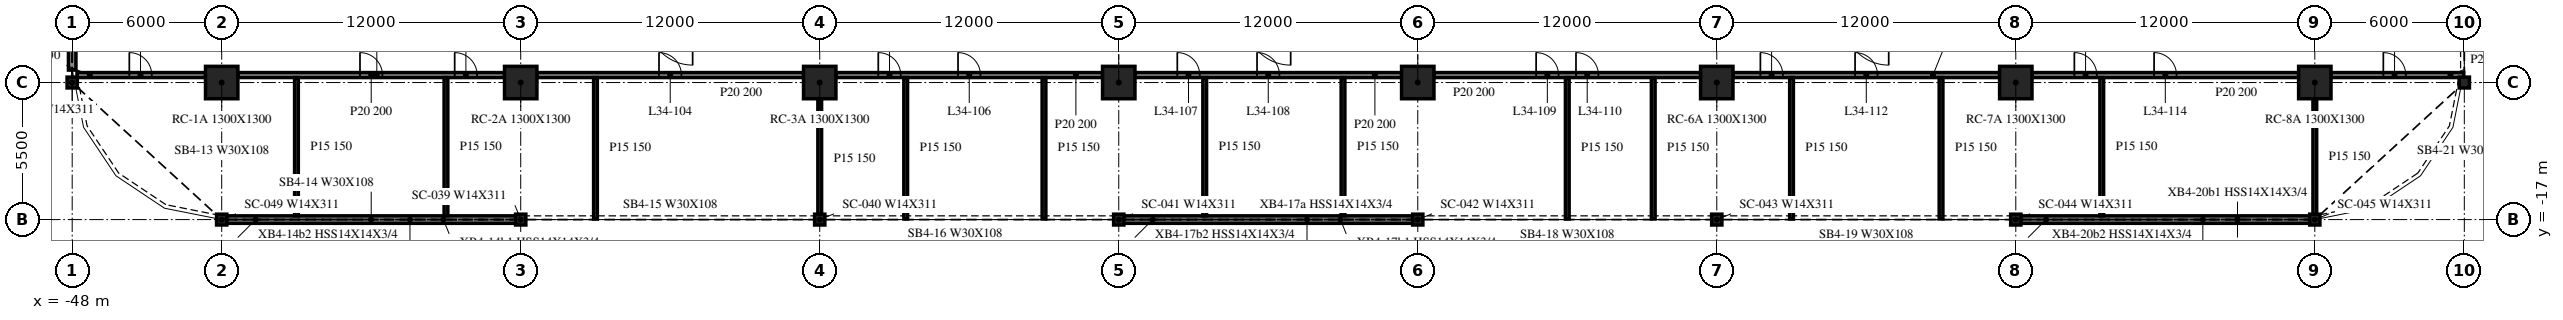
"""IFC4 building model, lengths in metres.
Left out: names, types, materials, properties, quantities, classifications, styles, units other than length and angle.
Written with IfcOpenShell. Run it as: python <this file> out.ifc"""

import sys

from ifc_helpers import new_model, si_unit, direction, frame, frame_2d, origin, origin_2d, place, context, subcontext, project, spatial, rectangle, i_section, extrude, element, fill, save


model = new_model("IFC4")
c1 = context("Model", 3, precision=1e-05, world=origin(), true_north=direction((0.0, 1.0)))
c2 = subcontext(c1, "Body", "Model", "MODEL_VIEW")
j1 = project(units=[si_unit("LENGTHUNIT", "METRE"), si_unit("PLANEANGLEUNIT", "RADIAN")], contexts=[c1])
p1 = place(None, origin())
s1 = spatial("IfcSite", under=j1, at=p1, CompositionType="ELEMENT")
p2 = place(p1, origin())
s2 = spatial("IfcBuilding", under=s1, at=p2, CompositionType="ELEMENT")
p3 = place(p2, frame((0.0, 0.0, 146.6)))
s3 = spatial("IfcBuildingStorey", under=s2, at=p3, CompositionType="ELEMENT", Elevation=146.6)
for number, where, z_axis, x_axis in (
    (1, (-42.0, -11.5, -0.34), (0.0, 0.0, 1.0), (1.0, 0.0, 0.0)),
    (2, (-30.0, -11.5, -0.34), (0.0, 0.0, 1.0), (1.0, 0.0, 0.0)),
    (3, (-18.0, -11.5, -0.34), (0.0, 0.0, 1.0), (1.0, 0.0, 0.0)),
    (4, (-6.0, -11.5, -0.34), (0.0, 0.0, 1.0), (1.0, 0.0, 0.0)),
    (5, (6.0, -11.5, -0.34), (0.0, 0.0, 1.0), (1.0, 0.0, 0.0)),
    (6, (18.0, -11.5, -0.34), (0.0, 0.0, 1.0), (1.0, 0.0, 0.0)),
    (7, (30.0, -11.5, -0.34), (0.0, 0.0, 1.0), (1.0, 0.0, 0.0)),
    (8, (42.0, -11.5, -0.34), (0.0, 0.0, 1.0), (1.0, 0.0, 0.0)),
):
    element("IfcColumn", number, at=place(p3, frame(where, z_axis=z_axis, x_axis=x_axis)), inside=s3, PredefinedType="COLUMN", context=c2, shape_type="SweptSolid", body=[
        extrude(rectangle(XDim=1.3, YDim=1.3, at=origin_2d()), origin(), (0.0, 0.0, 1.0), 4.1),
    ])
for number, where, z_axis, x_axis in (
    (9, (-48.0, -11.5, -0.34), (0.0, 0.0, 1.0), (1.0, 0.0, 0.0)),
    (10, (-42.0, -17.0, -0.34), (0.0, 0.0, 1.0), (1.0, 0.0, 0.0)),
    (11, (-30.0, -17.0, -0.34), (0.0, 0.0, 1.0), (1.0, 0.0, 0.0)),
    (12, (-18.0, -17.0, -0.34), (0.0, 0.0, 1.0), (1.0, 0.0, 0.0)),
    (13, (-6.0, -17.0, -0.34), (0.0, 0.0, 1.0), (1.0, 0.0, 0.0)),
    (14, (6.0, -17.0, -0.34), (0.0, 0.0, 1.0), (1.0, 0.0, 0.0)),
    (15, (18.0, -17.0, -0.34), (0.0, 0.0, 1.0), (1.0, 0.0, 0.0)),
    (16, (30.0, -17.0, -0.34), (0.0, 0.0, 1.0), (1.0, 0.0, 0.0)),
    (17, (42.0, -17.0, -0.34), (0.0, 0.0, 1.0), (1.0, 0.0, 0.0)),
    (18, (48.0, -11.5, -0.34), (0.0, 0.0, 1.0), (1.0, 0.0, 0.0)),
):
    element("IfcColumn", number, at=place(p3, frame(where, z_axis=z_axis, x_axis=x_axis)), inside=s3, PredefinedType="COLUMN", context=c2, shape_type="SweptSolid", body=[
        extrude(i_section(OverallWidth=0.412, OverallDepth=0.434, WebThickness=0.036, FlangeThickness=0.057, at=origin_2d()), origin(), (0.0, 0.0, 1.0), 4.1),
    ])
p4 = place(p3, frame((-48.0, -0.218, 0.0), z_axis=(0.0, 0.0, 1.0), x_axis=(0.0, -1.0, 0.0)))
e19 = element("IfcWall", 19, at=p4, inside=s3, PredefinedType="NOTDEFINED", context=c2, shape_type="SweptSolid", body=[
    extrude(rectangle(XDim=10.782, YDim=0.3, at=frame_2d((5.391, 0.0))), origin(), (0.0, 0.0, 1.0), 3.003),
])
for number, where, z_axis, x_axis in (
    (20, (-41.982, -17.0, 0.0), (0.0, 0.0, 1.0), (1.0, 0.0, 0.0)),
    (21, (-5.982, -17.0, 0.0), (0.0, 0.0, 1.0), (1.0, 0.0, 0.0)),
    (22, (30.018, -17.0, 0.0), (0.0, 0.0, 1.0), (1.0, 0.0, 0.0)),
):
    element("IfcWall", number, at=place(p3, frame(where, z_axis=z_axis, x_axis=x_axis)), inside=s3, PredefinedType="NOTDEFINED", context=c2, shape_type="SweptSolid", body=[
        extrude(rectangle(XDim=11.964, YDim=0.3, at=frame_2d((5.982, 0.0))), origin(), (0.0, 0.0, 1.0), 3.003),
    ])
p5 = place(p3, frame((-47.807, -11.2, 0.0), z_axis=(0.0, 0.0, 1.0), x_axis=(1.0, 0.0, 0.0)))
e23 = element("IfcWall", 23, at=p5, inside=s3, PredefinedType="PARTITIONING", context=c2, shape_type="SweptSolid", body=[
    extrude(rectangle(XDim=5.157, YDim=0.2, at=frame_2d((2.579, 0.0))), origin(), (0.0, 0.0, 1.0), 3.76),
])
p6 = place(p5, frame((2.1, 0.0, 0.0)))
e24 = element("IfcOpeningElement", 24, at=p6, cuts=e23, PredefinedType="OPENING", context=c2, shape_type="SweptSolid", body=[
    extrude(rectangle(XDim=0.9, YDim=2.1, at=frame_2d((0.45, 1.05))), frame((0.0, 0.11, 0.0), z_axis=(0.0, -1.0, 0.0), x_axis=(1.0, 0.0, 0.0)), (0.0, 0.0, 1.0), 0.22),
])
p7 = place(p3, frame((-41.35, -11.2, 0.0), z_axis=(0.0, 0.0, 1.0), x_axis=(1.0, 0.0, 0.0)))
e25 = element("IfcWall", 25, at=p7, inside=s3, PredefinedType="PARTITIONING", context=c2, shape_type="SweptSolid", body=[
    extrude(rectangle(XDim=10.7, YDim=0.2, at=frame_2d((5.35, 0.0))), origin(), (0.0, 0.0, 1.0), 3.76),
])
p8 = place(p7, frame((4.9, 0.0, 0.0)))
e26 = element("IfcOpeningElement", 26, at=p8, cuts=e25, PredefinedType="OPENING", context=c2, shape_type="SweptSolid", body=[
    extrude(rectangle(XDim=0.9, YDim=2.1, at=frame_2d((0.45, 1.05))), frame((0.0, 0.11, 0.0), z_axis=(0.0, -1.0, 0.0), x_axis=(1.0, 0.0, 0.0)), (0.0, 0.0, 1.0), 0.22),
])
p9 = place(p7, frame((8.7, 0.0, 0.0)))
e27 = element("IfcOpeningElement", 27, at=p9, cuts=e25, PredefinedType="OPENING", context=c2, shape_type="SweptSolid", body=[
    extrude(rectangle(XDim=0.9, YDim=2.1, at=frame_2d((0.45, 1.05))), frame((0.0, 0.11, 0.0), z_axis=(0.0, -1.0, 0.0), x_axis=(1.0, 0.0, 0.0)), (0.0, 0.0, 1.0), 0.22),
])
p10 = place(p3, frame((-29.35, -11.2, 0.0), z_axis=(0.0, 0.0, 1.0), x_axis=(1.0, 0.0, 0.0)))
e28 = element("IfcWall", 28, at=p10, inside=s3, PredefinedType="PARTITIONING", context=c2, shape_type="SweptSolid", body=[
    extrude(rectangle(XDim=10.7, YDim=0.2, at=frame_2d((5.35, 0.0))), origin(), (0.0, 0.0, 1.0), 3.76),
])
p11 = place(p10, frame((4.9, 0.0, 0.0)))
e29 = element("IfcOpeningElement", 29, at=p11, cuts=e28, PredefinedType="OPENING", context=c2, shape_type="SweptSolid", body=[
    extrude(rectangle(XDim=0.9, YDim=2.1, at=frame_2d((0.45, 1.05))), frame((0.0, 0.11, 0.0), z_axis=(0.0, -1.0, 0.0), x_axis=(1.0, 0.0, 0.0)), (0.0, 0.0, 1.0), 0.22),
])
p12 = place(p3, frame((-17.35, -11.2, 0.0), z_axis=(0.0, 0.0, 1.0), x_axis=(1.0, 0.0, 0.0)))
e30 = element("IfcWall", 30, at=p12, inside=s3, PredefinedType="PARTITIONING", context=c2, shape_type="SweptSolid", body=[
    extrude(rectangle(XDim=10.7, YDim=0.2, at=frame_2d((5.35, 0.0))), origin(), (0.0, 0.0, 1.0), 3.76),
])
p13 = place(p12, frame((1.7, 0.0, 0.0)))
e31 = element("IfcOpeningElement", 31, at=p13, cuts=e30, PredefinedType="OPENING", context=c2, shape_type="SweptSolid", body=[
    extrude(rectangle(XDim=0.9, YDim=2.1, at=frame_2d((0.45, 1.05))), frame((0.0, 0.11, 0.0), z_axis=(0.0, -1.0, 0.0), x_axis=(1.0, 0.0, 0.0)), (0.0, 0.0, 1.0), 0.22),
])
p14 = place(p12, frame((4.9, 0.0, 0.0)))
e32 = element("IfcOpeningElement", 32, at=p14, cuts=e30, PredefinedType="OPENING", context=c2, shape_type="SweptSolid", body=[
    extrude(rectangle(XDim=0.9, YDim=2.1, at=frame_2d((0.45, 1.05))), frame((0.0, 0.11, 0.0), z_axis=(0.0, -1.0, 0.0), x_axis=(1.0, 0.0, 0.0)), (0.0, 0.0, 1.0), 0.22),
])
p15 = place(p3, frame((-5.35, -11.2, 0.0), z_axis=(0.0, 0.0, 1.0), x_axis=(1.0, 0.0, 0.0)))
e33 = element("IfcWall", 33, at=p15, inside=s3, PredefinedType="PARTITIONING", context=c2, shape_type="SweptSolid", body=[
    extrude(rectangle(XDim=10.7, YDim=0.2, at=frame_2d((5.35, 0.0))), origin(), (0.0, 0.0, 1.0), 3.76),
])
p16 = place(p15, frame((1.7, 0.0, 0.0)))
e34 = element("IfcOpeningElement", 34, at=p16, cuts=e33, PredefinedType="OPENING", context=c2, shape_type="SweptSolid", body=[
    extrude(rectangle(XDim=0.9, YDim=2.1, at=frame_2d((0.45, 1.05))), frame((0.0, 0.11, 0.0), z_axis=(0.0, -1.0, 0.0), x_axis=(1.0, 0.0, 0.0)), (0.0, 0.0, 1.0), 0.22),
])
p17 = place(p15, frame((4.9, 0.0, 0.0)))
e35 = element("IfcOpeningElement", 35, at=p17, cuts=e33, PredefinedType="OPENING", context=c2, shape_type="SweptSolid", body=[
    extrude(rectangle(XDim=0.9, YDim=2.1, at=frame_2d((0.45, 1.05))), frame((0.0, 0.11, 0.0), z_axis=(0.0, -1.0, 0.0), x_axis=(1.0, 0.0, 0.0)), (0.0, 0.0, 1.0), 0.22),
])
p18 = place(p3, frame((6.65, -11.2, 0.0), z_axis=(0.0, 0.0, 1.0), x_axis=(1.0, 0.0, 0.0)))
e36 = element("IfcWall", 36, at=p18, inside=s3, PredefinedType="PARTITIONING", context=c2, shape_type="SweptSolid", body=[
    extrude(rectangle(XDim=10.7, YDim=0.2, at=frame_2d((5.35, 0.0))), origin(), (0.0, 0.0, 1.0), 3.76),
])
p19 = place(p18, frame((4.1, 0.0, 0.0)))
e37 = element("IfcOpeningElement", 37, at=p19, cuts=e36, PredefinedType="OPENING", context=c2, shape_type="SweptSolid", body=[
    extrude(rectangle(XDim=0.9, YDim=2.1, at=frame_2d((0.45, 1.05))), frame((0.0, 0.11, 0.0), z_axis=(0.0, -1.0, 0.0), x_axis=(1.0, 0.0, 0.0)), (0.0, 0.0, 1.0), 0.22),
])
p20 = place(p18, frame((5.7, 0.0, 0.0)))
e38 = element("IfcOpeningElement", 38, at=p20, cuts=e36, PredefinedType="OPENING", context=c2, shape_type="SweptSolid", body=[
    extrude(rectangle(XDim=0.9, YDim=2.1, at=frame_2d((0.45, 1.05))), frame((0.0, 0.11, 0.0), z_axis=(0.0, -1.0, 0.0), x_axis=(1.0, 0.0, 0.0)), (0.0, 0.0, 1.0), 0.22),
])
p21 = place(p3, frame((18.65, -11.2, 0.0), z_axis=(0.0, 0.0, 1.0), x_axis=(1.0, 0.0, 0.0)))
e39 = element("IfcWall", 39, at=p21, inside=s3, PredefinedType="PARTITIONING", context=c2, shape_type="SweptSolid", body=[
    extrude(rectangle(XDim=10.7, YDim=0.2, at=frame_2d((5.35, 0.0))), origin(), (0.0, 0.0, 1.0), 3.76),
])
p22 = place(p21, frame((1.1, 0.0, 0.0)))
e40 = element("IfcOpeningElement", 40, at=p22, cuts=e39, PredefinedType="OPENING", context=c2, shape_type="SweptSolid", body=[
    extrude(rectangle(XDim=0.9, YDim=2.1, at=frame_2d((0.45, 1.05))), frame((0.0, 0.11, 0.0), z_axis=(0.0, -1.0, 0.0), x_axis=(1.0, 0.0, 0.0)), (0.0, 0.0, 1.0), 0.22),
])
p23 = place(p21, frame((4.9, 0.0, 0.0)))
e41 = element("IfcOpeningElement", 41, at=p23, cuts=e39, PredefinedType="OPENING", context=c2, shape_type="SweptSolid", body=[
    extrude(rectangle(XDim=0.9, YDim=2.1, at=frame_2d((0.45, 1.05))), frame((0.0, 0.11, 0.0), z_axis=(0.0, -1.0, 0.0), x_axis=(1.0, 0.0, 0.0)), (0.0, 0.0, 1.0), 0.22),
])
p24 = place(p3, frame((30.65, -11.2, 0.0), z_axis=(0.0, 0.0, 1.0), x_axis=(1.0, 0.0, 0.0)))
e42 = element("IfcWall", 42, at=p24, inside=s3, PredefinedType="PARTITIONING", context=c2, shape_type="SweptSolid", body=[
    extrude(rectangle(XDim=10.7, YDim=0.2, at=frame_2d((5.35, 0.0))), origin(), (0.0, 0.0, 1.0), 3.76),
])
p25 = place(p24, frame((1.7, 0.0, 0.0)))
e43 = element("IfcOpeningElement", 43, at=p25, cuts=e42, PredefinedType="OPENING", context=c2, shape_type="SweptSolid", body=[
    extrude(rectangle(XDim=0.9, YDim=2.1, at=frame_2d((0.45, 1.05))), frame((0.0, 0.11, 0.0), z_axis=(0.0, -1.0, 0.0), x_axis=(1.0, 0.0, 0.0)), (0.0, 0.0, 1.0), 0.22),
])
p26 = place(p24, frame((4.9, 0.0, 0.0)))
e44 = element("IfcOpeningElement", 44, at=p26, cuts=e42, PredefinedType="OPENING", context=c2, shape_type="SweptSolid", body=[
    extrude(rectangle(XDim=0.9, YDim=2.1, at=frame_2d((0.45, 1.05))), frame((0.0, 0.11, 0.0), z_axis=(0.0, -1.0, 0.0), x_axis=(1.0, 0.0, 0.0)), (0.0, 0.0, 1.0), 0.22),
])
p27 = place(p3, frame((42.65, -11.2, 0.0), z_axis=(0.0, 0.0, 1.0), x_axis=(1.0, 0.0, 0.0)))
e45 = element("IfcWall", 45, at=p27, inside=s3, PredefinedType="PARTITIONING", context=c2, shape_type="SweptSolid", body=[
    extrude(rectangle(XDim=5.325, YDim=0.2, at=frame_2d((2.663, 0.0))), origin(), (0.0, 0.0, 1.0), 3.76),
])
p28 = place(p27, frame((2.1, 0.0, 0.0)))
e46 = element("IfcOpeningElement", 46, at=p28, cuts=e45, PredefinedType="OPENING", context=c2, shape_type="SweptSolid", body=[
    extrude(rectangle(XDim=0.9, YDim=2.1, at=frame_2d((0.45, 1.05))), frame((0.0, 0.11, 0.0), z_axis=(0.0, -1.0, 0.0), x_axis=(1.0, 0.0, 0.0)), (0.0, 0.0, 1.0), 0.22),
])
for number, where, z_axis, x_axis in (
    (47, (-39.0, -16.85, 0.0), (0.0, 0.0, 1.0), (0.0, 1.0, 0.0)),
    (48, (-33.0, -16.85, 0.0), (0.0, 0.0, 1.0), (0.0, 1.0, 0.0)),
):
    element("IfcWall", number, at=place(p3, frame(where, z_axis=z_axis, x_axis=x_axis)), inside=s3, PredefinedType="PARTITIONING", context=c2, shape_type="SweptSolid", body=[
        extrude(rectangle(XDim=5.55, YDim=0.15, at=frame_2d((2.775, 0.0))), origin(), (0.0, 0.0, 1.0), 3.76),
    ])
p29 = place(p3, frame((-27.0, -16.975, 0.0), z_axis=(0.0, 0.0, 1.0), x_axis=(0.0, 1.0, 0.0)))
e49 = element("IfcWall", 49, at=p29, inside=s3, PredefinedType="PARTITIONING", context=c2, shape_type="SweptSolid", body=[
    extrude(rectangle(XDim=5.675, YDim=0.15, at=frame_2d((2.837, 0.0))), origin(), (0.0, 0.0, 1.0), 3.76),
])
p30 = place(p3, frame((-18.0, -16.975, 0.0), z_axis=(0.0, 0.0, 1.0), x_axis=(0.0, 1.0, 0.0)))
e50 = element("IfcWall", 50, at=p30, inside=s3, PredefinedType="PARTITIONING", context=c2, shape_type="SweptSolid", body=[
    extrude(rectangle(XDim=4.825, YDim=0.15, at=frame_2d((2.413, 0.0))), origin(), (0.0, 0.0, 1.0), 3.76),
])
for number, where, z_axis, x_axis in (
    (51, (-14.55, -16.975, 0.0), (0.0, 0.0, 1.0), (0.0, 1.0, 0.0)),
    (52, (-9.0, -16.975, 0.0), (0.0, 0.0, 1.0), (0.0, 1.0, 0.0)),
):
    element("IfcWall", number, at=place(p3, frame(where, z_axis=z_axis, x_axis=x_axis)), inside=s3, PredefinedType="PARTITIONING", context=c2, shape_type="SweptSolid", body=[
        extrude(rectangle(XDim=5.675, YDim=0.15, at=frame_2d((2.837, 0.0))), origin(), (0.0, 0.0, 1.0), 3.76),
    ])
for number, where, z_axis, x_axis in (
    (53, (-2.55, -16.85, 0.0), (0.0, 0.0, 1.0), (0.0, 1.0, 0.0)),
    (54, (3.0, -16.85, 0.0), (0.0, 0.0, 1.0), (0.0, 1.0, 0.0)),
):
    element("IfcWall", number, at=place(p3, frame(where, z_axis=z_axis, x_axis=x_axis)), inside=s3, PredefinedType="PARTITIONING", context=c2, shape_type="SweptSolid", body=[
        extrude(rectangle(XDim=5.55, YDim=0.15, at=frame_2d((2.775, 0.0))), origin(), (0.0, 0.0, 1.0), 3.76),
    ])
for number, where, z_axis, x_axis in (
    (55, (12.0, -16.975, 0.0), (0.0, 0.0, 1.0), (0.0, 1.0, 0.0)),
    (56, (15.45, -16.975, 0.0), (0.0, 0.0, 1.0), (0.0, 1.0, 0.0)),
    (57, (21.0, -16.975, 0.0), (0.0, 0.0, 1.0), (0.0, 1.0, 0.0)),
    (58, (27.0, -16.975, 0.0), (0.0, 0.0, 1.0), (0.0, 1.0, 0.0)),
):
    element("IfcWall", number, at=place(p3, frame(where, z_axis=z_axis, x_axis=x_axis)), inside=s3, PredefinedType="PARTITIONING", context=c2, shape_type="SweptSolid", body=[
        extrude(rectangle(XDim=5.675, YDim=0.15, at=frame_2d((2.837, 0.0))), origin(), (0.0, 0.0, 1.0), 3.76),
    ])
p31 = place(p3, frame((33.45, -16.85, 0.0), z_axis=(0.0, 0.0, 1.0), x_axis=(0.0, 1.0, 0.0)))
e59 = element("IfcWall", 59, at=p31, inside=s3, PredefinedType="PARTITIONING", context=c2, shape_type="SweptSolid", body=[
    extrude(rectangle(XDim=5.55, YDim=0.15, at=frame_2d((2.775, 0.0))), origin(), (0.0, 0.0, 1.0), 3.76),
])
p32 = place(p3, frame((42.0, -16.847, 0.0), z_axis=(0.0, 0.0, 1.0), x_axis=(0.0, 1.0, 0.0)))
e60 = element("IfcWall", 60, at=p32, inside=s3, PredefinedType="PARTITIONING", context=c2, shape_type="SweptSolid", body=[
    extrude(rectangle(XDim=4.697, YDim=0.15, at=frame_2d((2.349, 0.0))), origin(), (0.0, 0.0, 1.0), 3.76),
])
p33 = place(p6, origin())
e61 = element("IfcDoor", 61, at=p33, inside=s3, OperationType="SINGLE_SWING_RIGHT", PredefinedType="DOOR", context=c2, shape_type="SweptSolid", body=[
    extrude(rectangle(XDim=0.9, YDim=2.1, at=frame_2d((0.45, 1.05))), frame((0.0, 0.025, 0.0), z_axis=(0.0, -1.0, 0.0), x_axis=(1.0, 0.0, 0.0)), (0.0, 0.0, 1.0), 0.05),
])
fill(e24, e61)
p34 = place(p8, origin())
e62 = element("IfcDoor", 62, at=p34, inside=s3, OperationType="SINGLE_SWING_RIGHT", PredefinedType="DOOR", context=c2, shape_type="SweptSolid", body=[
    extrude(rectangle(XDim=0.9, YDim=2.1, at=frame_2d((0.45, 1.05))), frame((0.0, 0.025, 0.0), z_axis=(0.0, -1.0, 0.0), x_axis=(1.0, 0.0, 0.0)), (0.0, 0.0, 1.0), 0.05),
])
fill(e26, e62)
p35 = place(p9, origin())
e63 = element("IfcDoor", 63, at=p35, inside=s3, OperationType="SINGLE_SWING_LEFT", PredefinedType="DOOR", context=c2, shape_type="SweptSolid", body=[
    extrude(rectangle(XDim=0.9, YDim=2.1, at=frame_2d((0.45, 1.05))), frame((0.0, 0.025, 0.0), z_axis=(0.0, -1.0, 0.0), x_axis=(1.0, 0.0, 0.0)), (0.0, 0.0, 1.0), 0.05),
])
fill(e27, e63)
p36 = place(p11, origin())
e64 = element("IfcDoor", 64, at=p36, inside=s3, OperationType="SINGLE_SWING_RIGHT", PredefinedType="DOOR", context=c2, shape_type="SweptSolid", body=[
    extrude(rectangle(XDim=0.9, YDim=2.1, at=frame_2d((0.45, 1.05))), frame((0.0, 0.025, 0.0), z_axis=(0.0, -1.0, 0.0), x_axis=(1.0, 0.0, 0.0)), (0.0, 0.0, 1.0), 0.05),
])
fill(e29, e64)
p37 = place(p13, origin())
e65 = element("IfcDoor", 65, at=p37, inside=s3, OperationType="SINGLE_SWING_RIGHT", PredefinedType="DOOR", context=c2, shape_type="SweptSolid", body=[
    extrude(rectangle(XDim=0.9, YDim=2.1, at=frame_2d((0.45, 1.05))), frame((0.0, 0.025, 0.0), z_axis=(0.0, -1.0, 0.0), x_axis=(1.0, 0.0, 0.0)), (0.0, 0.0, 1.0), 0.05),
])
fill(e31, e65)
p38 = place(p14, origin())
e66 = element("IfcDoor", 66, at=p38, inside=s3, OperationType="SINGLE_SWING_LEFT", PredefinedType="DOOR", context=c2, shape_type="SweptSolid", body=[
    extrude(rectangle(XDim=0.9, YDim=2.1, at=frame_2d((0.45, 1.05))), frame((0.0, 0.025, 0.0), z_axis=(0.0, -1.0, 0.0), x_axis=(1.0, 0.0, 0.0)), (0.0, 0.0, 1.0), 0.05),
])
fill(e32, e66)
p39 = place(p16, origin())
e67 = element("IfcDoor", 67, at=p39, inside=s3, OperationType="SINGLE_SWING_RIGHT", PredefinedType="DOOR", context=c2, shape_type="SweptSolid", body=[
    extrude(rectangle(XDim=0.9, YDim=2.1, at=frame_2d((0.45, 1.05))), frame((0.0, 0.025, 0.0), z_axis=(0.0, -1.0, 0.0), x_axis=(1.0, 0.0, 0.0)), (0.0, 0.0, 1.0), 0.05),
])
fill(e34, e67)
p40 = place(p17, origin())
e68 = element("IfcDoor", 68, at=p40, inside=s3, OperationType="SINGLE_SWING_LEFT", PredefinedType="DOOR", context=c2, shape_type="SweptSolid", body=[
    extrude(rectangle(XDim=0.9, YDim=2.1, at=frame_2d((0.45, 1.05))), frame((0.0, 0.025, 0.0), z_axis=(0.0, -1.0, 0.0), x_axis=(1.0, 0.0, 0.0)), (0.0, 0.0, 1.0), 0.05),
])
fill(e35, e68)
p41 = place(p19, origin())
e69 = element("IfcDoor", 69, at=p41, inside=s3, OperationType="SINGLE_SWING_RIGHT", PredefinedType="DOOR", context=c2, shape_type="SweptSolid", body=[
    extrude(rectangle(XDim=0.9, YDim=2.1, at=frame_2d((0.45, 1.05))), frame((0.0, 0.025, 0.0), z_axis=(0.0, -1.0, 0.0), x_axis=(1.0, 0.0, 0.0)), (0.0, 0.0, 1.0), 0.05),
])
fill(e37, e69)
p42 = place(p20, origin())
e70 = element("IfcDoor", 70, at=p42, inside=s3, OperationType="SINGLE_SWING_LEFT", PredefinedType="DOOR", context=c2, shape_type="SweptSolid", body=[
    extrude(rectangle(XDim=0.9, YDim=2.1, at=frame_2d((0.45, 1.05))), frame((0.0, 0.025, 0.0), z_axis=(0.0, -1.0, 0.0), x_axis=(1.0, 0.0, 0.0)), (0.0, 0.0, 1.0), 0.05),
])
fill(e38, e70)
p43 = place(p22, origin())
e71 = element("IfcDoor", 71, at=p43, inside=s3, OperationType="SINGLE_SWING_RIGHT", PredefinedType="DOOR", context=c2, shape_type="SweptSolid", body=[
    extrude(rectangle(XDim=0.9, YDim=2.1, at=frame_2d((0.45, 1.05))), frame((0.0, 0.025, 0.0), z_axis=(0.0, -1.0, 0.0), x_axis=(1.0, 0.0, 0.0)), (0.0, 0.0, 1.0), 0.05),
])
fill(e40, e71)
p44 = place(p23, origin())
e72 = element("IfcDoor", 72, at=p44, inside=s3, OperationType="SINGLE_SWING_RIGHT", PredefinedType="DOOR", context=c2, shape_type="SweptSolid", body=[
    extrude(rectangle(XDim=0.9, YDim=2.1, at=frame_2d((0.45, 1.05))), frame((0.0, 0.025, 0.0), z_axis=(0.0, -1.0, 0.0), x_axis=(1.0, 0.0, 0.0)), (0.0, 0.0, 1.0), 0.05),
])
fill(e41, e72)
p45 = place(p25, origin())
e73 = element("IfcDoor", 73, at=p45, inside=s3, OperationType="SINGLE_SWING_RIGHT", PredefinedType="DOOR", context=c2, shape_type="SweptSolid", body=[
    extrude(rectangle(XDim=0.9, YDim=2.1, at=frame_2d((0.45, 1.05))), frame((0.0, 0.025, 0.0), z_axis=(0.0, -1.0, 0.0), x_axis=(1.0, 0.0, 0.0)), (0.0, 0.0, 1.0), 0.05),
])
fill(e43, e73)
p46 = place(p26, origin())
e74 = element("IfcDoor", 74, at=p46, inside=s3, OperationType="SINGLE_SWING_RIGHT", PredefinedType="DOOR", context=c2, shape_type="SweptSolid", body=[
    extrude(rectangle(XDim=0.9, YDim=2.1, at=frame_2d((0.45, 1.05))), frame((0.0, 0.025, 0.0), z_axis=(0.0, -1.0, 0.0), x_axis=(1.0, 0.0, 0.0)), (0.0, 0.0, 1.0), 0.05),
])
fill(e44, e74)
p47 = place(p28, origin())
e75 = element("IfcDoor", 75, at=p47, inside=s3, OperationType="SINGLE_SWING_RIGHT", PredefinedType="DOOR", context=c2, shape_type="SweptSolid", body=[
    extrude(rectangle(XDim=0.9, YDim=2.1, at=frame_2d((0.45, 1.05))), frame((0.0, 0.025, 0.0), z_axis=(0.0, -1.0, 0.0), x_axis=(1.0, 0.0, 0.0)), (0.0, 0.0, 1.0), 0.05),
])
fill(e46, e75)
save(model, sys.argv[1])
